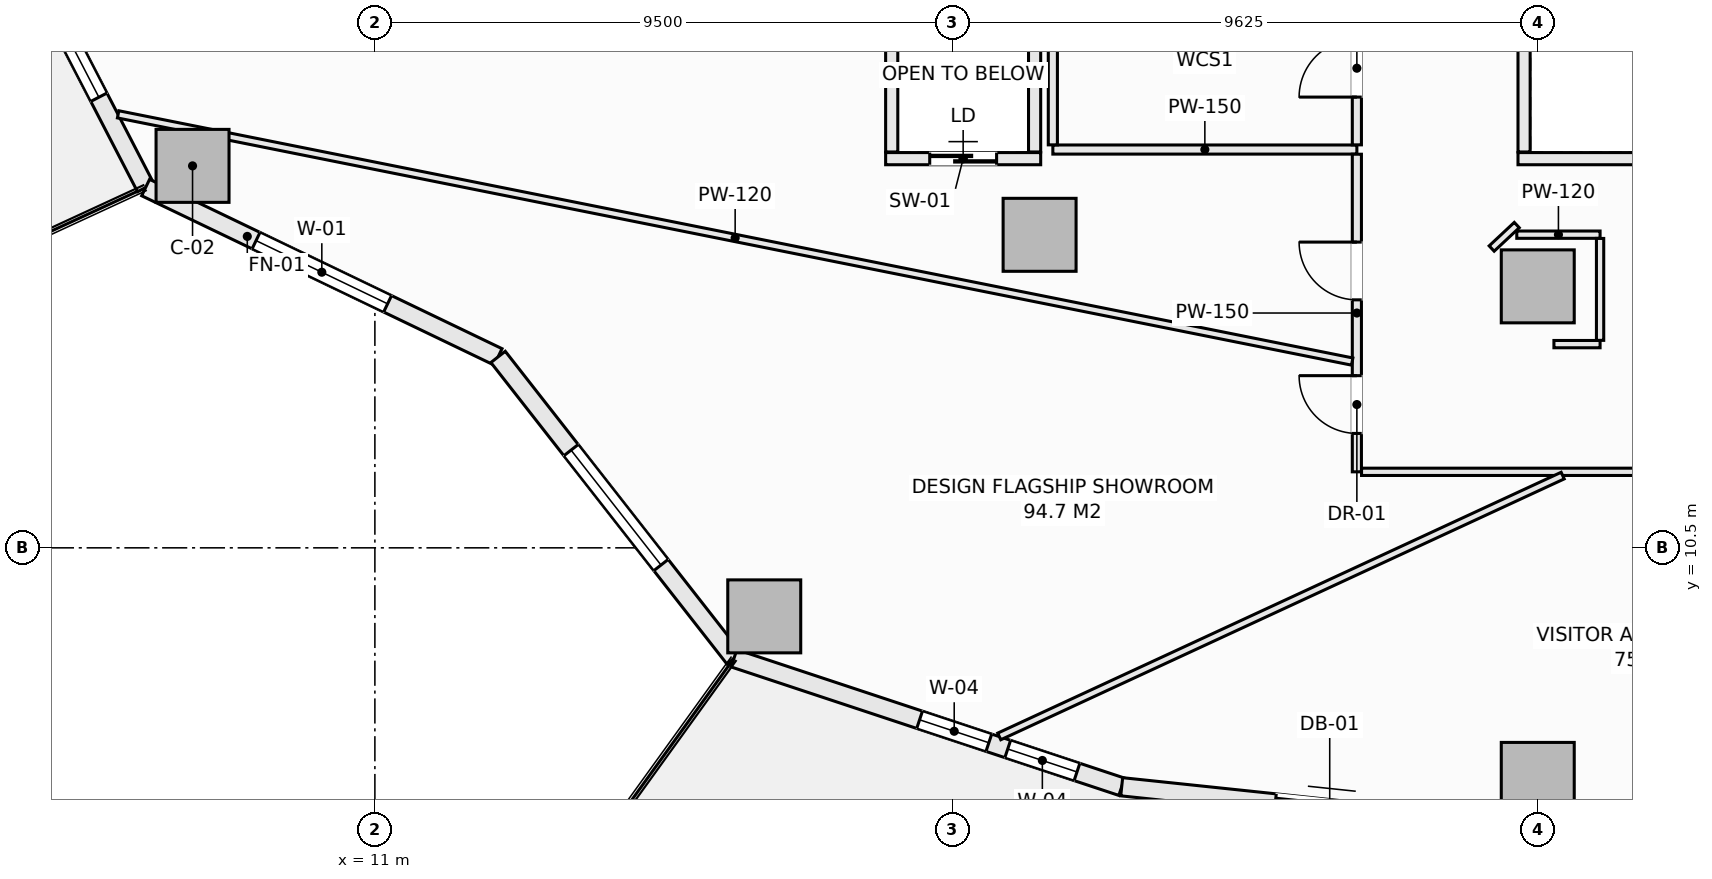
"""IFC4 building model, lengths in metres.
Left out: names, types, materials, properties, quantities, classifications, styles, units other than length and angle.
Written with IfcOpenShell. Run it as: python <this file> out.ifc"""

import sys

from ifc_helpers import new_model, si_unit, direction, frame, frame_2d, origin, origin_2d, place, context, subcontext, project, spatial, rectangle, extrude, element, fill, save


model = new_model("IFC4")
c1 = context("Model", 3, precision=1e-05, world=origin(), true_north=direction((0.0, 1.0)))
c2 = subcontext(c1, "Body", "Model", "MODEL_VIEW")
j1 = project(units=[si_unit("LENGTHUNIT", "METRE"), si_unit("PLANEANGLEUNIT", "RADIAN")], contexts=[c1])
p1 = place(None, origin())
s1 = spatial("IfcSite", under=j1, at=p1, CompositionType="ELEMENT")
p2 = place(p1, origin())
s2 = spatial("IfcBuilding", under=s1, at=p2, CompositionType="ELEMENT")
p3 = place(p2, frame((0.0, 0.0, 57.3)))
s3 = spatial("IfcBuildingStorey", under=s2, at=p3, CompositionType="ELEMENT", Elevation=57.3)
for number, where, z_axis, x_axis in (
    (1, (8.001, 16.781, -0.28), (0.0, 0.0, 1.0), (1.0, 0.0, 0.0)),
    (2, (17.404, 9.373, -0.28), (0.0, 0.0, 1.0), (1.0, 0.0, 0.0)),
    (3, (30.125, 6.7, -0.28), (0.0, 0.0, 1.0), (1.0, 0.0, 0.0)),
    (4, (21.932, 15.648, -0.28), (0.0, 0.0, 1.0), (1.0, 0.0, 0.0)),
    (5, (30.125, 14.8, -0.28), (0.0, 0.0, 1.0), (1.0, 0.0, 0.0)),
):
    element("IfcColumn", number, at=place(p3, frame(where, z_axis=z_axis, x_axis=x_axis)), inside=s3, PredefinedType="COLUMN", context=c2, shape_type="SweptSolid", body=[
        extrude(rectangle(XDim=1.2, YDim=1.2, at=origin_2d()), origin(), (0.0, 0.0, 1.0), 3.85),
    ])
p4 = place(p3, frame((4.588, 21.526, 0.0), z_axis=(0.0, 0.0, 1.0), x_axis=(0.459800981414, -0.888021991558, 0.0)))
e6 = element("IfcWall", 6, at=p4, inside=s3, PredefinedType="SOLIDWALL", context=c2, shape_type="SweptSolid", body=[
    extrude(rectangle(XDim=5.744, YDim=0.3, at=frame_2d((2.872, 0.0))), origin(), (0.0, 0.0, 1.0), 3.093),
])
p5 = place(p4, frame((1.672, 0.0, 0.85)))
e7 = element("IfcOpeningElement", 7, at=p5, cuts=e6, PredefinedType="OPENING", context=c2, shape_type="SweptSolid", body=[
    extrude(rectangle(XDim=2.4, YDim=1.9, at=frame_2d((1.2, 0.95))), frame((0.0, 0.16, 0.0), z_axis=(0.0, -1.0, 0.0), x_axis=(1.0, 0.0, 0.0)), (0.0, 0.0, 1.0), 0.32),
])
p6 = place(p3, frame((7.229, 16.425, 0.0), z_axis=(0.0, 0.0, 1.0), x_axis=(0.901354747727, -0.433081538224, 0.0)))
e8 = element("IfcWall", 8, at=p6, inside=s3, PredefinedType="SOLIDWALL", context=c2, shape_type="SweptSolid", body=[
    extrude(rectangle(XDim=6.431, YDim=0.3, at=frame_2d((3.215, 0.0))), origin(), (0.0, 0.0, 1.0), 3.093),
])
p7 = place(p6, frame((2.015, 0.0, 0.85)))
e9 = element("IfcOpeningElement", 9, at=p7, cuts=e8, PredefinedType="OPENING", context=c2, shape_type="SweptSolid", body=[
    extrude(rectangle(XDim=2.4, YDim=1.9, at=frame_2d((1.2, 0.95))), frame((0.0, 0.16, 0.0), z_axis=(0.0, -1.0, 0.0), x_axis=(1.0, 0.0, 0.0)), (0.0, 0.0, 1.0), 0.32),
])
p8 = place(p3, frame((13.026, 13.64, 0.0), z_axis=(0.0, 0.0, 1.0), x_axis=(0.616434798832, -0.78740595552, 0.0)))
e10 = element("IfcWall", 10, at=p8, inside=s3, PredefinedType="SOLIDWALL", context=c2, shape_type="SweptSolid", body=[
    extrude(rectangle(XDim=6.294, YDim=0.3, at=frame_2d((3.147, 0.0))), origin(), (0.0, 0.0, 1.0), 3.093),
])
p9 = place(p8, frame((1.947, 0.0, 0.85)))
e11 = element("IfcOpeningElement", 11, at=p9, cuts=e10, PredefinedType="OPENING", context=c2, shape_type="SweptSolid", body=[
    extrude(rectangle(XDim=2.4, YDim=1.9, at=frame_2d((1.2, 0.95))), frame((0.0, 0.16, 0.0), z_axis=(0.0, -1.0, 0.0), x_axis=(1.0, 0.0, 0.0)), (0.0, 0.0, 1.0), 0.32),
])
p10 = place(p3, frame((16.906, 8.684, 0.0), z_axis=(0.0, 0.0, 1.0), x_axis=(0.949245153629, -0.314537181127, 0.0)))
e12 = element("IfcWall", 12, at=p10, inside=s3, PredefinedType="SOLIDWALL", context=c2, shape_type="SweptSolid", body=[
    extrude(rectangle(XDim=6.717, YDim=0.3, at=frame_2d((3.358, 0.0))), origin(), (0.0, 0.0, 1.0), 3.093),
])
p11 = place(p10, frame((3.215, 0.0, 0.85)))
e13 = element("IfcOpeningElement", 13, at=p11, cuts=e12, PredefinedType="OPENING", context=c2, shape_type="SweptSolid", body=[
    extrude(rectangle(XDim=1.2, YDim=1.9, at=frame_2d((0.6, 0.95))), frame((0.0, 0.16, 0.0), z_axis=(0.0, -1.0, 0.0), x_axis=(1.0, 0.0, 0.0)), (0.0, 0.0, 1.0), 0.32),
])
p12 = place(p10, frame((4.742, 0.0, 0.85)))
e14 = element("IfcOpeningElement", 14, at=p12, cuts=e12, PredefinedType="OPENING", context=c2, shape_type="SweptSolid", body=[
    extrude(rectangle(XDim=1.2, YDim=1.9, at=frame_2d((0.6, 0.95))), frame((0.0, 0.16, 0.0), z_axis=(0.0, -1.0, 0.0), x_axis=(1.0, 0.0, 0.0)), (0.0, 0.0, 1.0), 0.32),
])
p13 = place(p3, frame((23.282, 6.571, 0.0), z_axis=(0.0, 0.0, 1.0), x_axis=(0.994498840295, -0.104747585419, 0.0)))
e15 = element("IfcWall", 15, at=p13, inside=s3, PredefinedType="SOLIDWALL", context=c2, shape_type="SweptSolid", body=[
    extrude(rectangle(XDim=6.88, YDim=0.3, at=frame_2d((3.44, 0.0))), origin(), (0.0, 0.0, 1.0), 3.093),
])
p14 = place(p13, frame((2.54, 0.0, 0.0)))
e16 = element("IfcOpeningElement", 16, at=p14, cuts=e15, PredefinedType="OPENING", context=c2, shape_type="SweptSolid", body=[
    extrude(rectangle(XDim=1.8, YDim=2.25, at=frame_2d((0.9, 1.125))), frame((0.0, 0.16, 0.0), z_axis=(0.0, -1.0, 0.0), x_axis=(1.0, 0.0, 0.0)), (0.0, 0.0, 1.0), 0.32),
])
p15 = place(p3, frame((30.125, 5.85, 0.0), z_axis=(0.0, 0.0, 1.0), x_axis=(0.994498840295, 0.104747585419, 0.0)))
e17 = element("IfcWall", 17, at=p15, inside=s3, PredefinedType="SOLIDWALL", context=c2, shape_type="SweptSolid", body=[
    extrude(rectangle(XDim=6.88, YDim=0.3, at=frame_2d((3.44, 0.0))), origin(), (0.0, 0.0, 1.0), 3.093),
])
p16 = place(p15, frame((2.24, 0.0, 0.85)))
e18 = element("IfcOpeningElement", 18, at=p16, cuts=e17, PredefinedType="OPENING", context=c2, shape_type="SweptSolid", body=[
    extrude(rectangle(XDim=2.4, YDim=1.9, at=frame_2d((1.2, 0.95))), frame((0.0, 0.16, 0.0), z_axis=(0.0, -1.0, 0.0), x_axis=(1.0, 0.0, 0.0)), (0.0, 0.0, 1.0), 0.32),
])
p17 = place(p3, frame((19.4, 16.9, 0.0), z_axis=(0.0, 0.0, 1.0), x_axis=(1.0, 0.0, 0.0)))
e19 = element("IfcWall", 19, at=p17, inside=s3, PredefinedType="SOLIDWALL", context=c2, shape_type="SweptSolid", body=[
    extrude(rectangle(XDim=2.55, YDim=0.2, at=frame_2d((1.275, 0.0))), origin(), (0.0, 0.0, 1.0), 3.57),
])
p18 = place(p17, frame((0.725, 0.0, 0.0)))
e20 = element("IfcOpeningElement", 20, at=p18, cuts=e19, PredefinedType="OPENING", context=c2, shape_type="SweptSolid", body=[
    extrude(rectangle(XDim=1.1, YDim=2.2, at=frame_2d((0.55, 1.1))), frame((0.0, 0.11, 0.0), z_axis=(0.0, -1.0, 0.0), x_axis=(1.0, 0.0, 0.0)), (0.0, 0.0, 1.0), 0.22),
])
for number, where, z_axis, x_axis in (
    (21, (19.5, 17.01, 0.0), (0.0, 0.0, 1.0), (0.0, 1.0, 0.0)),
    (22, (21.85, 17.01, 0.0), (0.0, 0.0, 1.0), (0.0, 1.0, 0.0)),
):
    element("IfcWall", number, at=place(p3, frame(where, z_axis=z_axis, x_axis=x_axis)), inside=s3, PredefinedType="SOLIDWALL", context=c2, shape_type="SweptSolid", body=[
        extrude(rectangle(XDim=2.53, YDim=0.2, at=frame_2d((1.265, 0.0))), origin(), (0.0, 0.0, 1.0), 3.57),
    ])
p19 = place(p3, frame((29.8, 16.9, 0.0), z_axis=(0.0, 0.0, 1.0), x_axis=(1.0, 0.0, 0.0)))
e23 = element("IfcWall", 23, at=p19, inside=s3, PredefinedType="SOLIDWALL", context=c2, shape_type="SweptSolid", body=[
    extrude(rectangle(XDim=2.45, YDim=0.2, at=frame_2d((1.225, 0.0))), origin(), (0.0, 0.0, 1.0), 3.57),
])
p20 = place(p3, frame((29.9, 17.01, 0.0), z_axis=(0.0, 0.0, 1.0), x_axis=(0.0, 1.0, 0.0)))
e24 = element("IfcWall", 24, at=p20, inside=s3, PredefinedType="SOLIDWALL", context=c2, shape_type="SweptSolid", body=[
    extrude(rectangle(XDim=2.43, YDim=0.2, at=frame_2d((1.215, 0.0))), origin(), (0.0, 0.0, 1.0), 3.57),
])
p21 = place(p3, frame((22.15, 17.05, 0.0), z_axis=(0.0, 0.0, 1.0), x_axis=(1.0, 0.0, 0.0)))
e25 = element("IfcWall", 25, at=p21, inside=s3, PredefinedType="PARTITIONING", context=c2, shape_type="SweptSolid", body=[
    extrude(rectangle(XDim=5.0, YDim=0.15, at=frame_2d((2.5, 0.0))), origin(), (0.0, 0.0, 1.0), 3.57),
])
p22 = place(p3, frame((22.15, 17.127, 0.0), z_axis=(0.0, 0.0, 1.0), x_axis=(0.0, 1.0, 0.0)))
e26 = element("IfcWall", 26, at=p22, inside=s3, PredefinedType="PARTITIONING", context=c2, shape_type="SweptSolid", body=[
    extrude(rectangle(XDim=2.521, YDim=0.15, at=frame_2d((1.26, 0.0))), origin(), (0.0, 0.0, 1.0), 3.57),
])
p23 = place(p3, frame((27.15, 11.75, 0.0), z_axis=(0.0, 0.0, 1.0), x_axis=(0.0, 1.0, 0.0)))
e27 = element("IfcWall", 27, at=p23, inside=s3, PredefinedType="PARTITIONING", context=c2, shape_type="SweptSolid", body=[
    extrude(rectangle(XDim=5.223, YDim=0.15, at=frame_2d((2.611, 0.0))), origin(), (0.0, 0.0, 1.0), 3.57),
])
p24 = place(p23, frame((0.631, 0.0, 0.0)))
e28 = element("IfcOpeningElement", 28, at=p24, cuts=e27, PredefinedType="OPENING", context=c2, shape_type="SweptSolid", body=[
    extrude(rectangle(XDim=0.95, YDim=2.1, at=frame_2d((0.475, 1.05))), frame((0.0, 0.085, 0.0), z_axis=(0.0, -1.0, 0.0), x_axis=(1.0, 0.0, 0.0)), (0.0, 0.0, 1.0), 0.17),
])
p25 = place(p23, frame((2.828, 0.0, 0.0)))
e29 = element("IfcOpeningElement", 29, at=p25, cuts=e27, PredefinedType="OPENING", context=c2, shape_type="SweptSolid", body=[
    extrude(rectangle(XDim=0.95, YDim=2.1, at=frame_2d((0.475, 1.05))), frame((0.0, 0.085, 0.0), z_axis=(0.0, -1.0, 0.0), x_axis=(1.0, 0.0, 0.0)), (0.0, 0.0, 1.0), 0.17),
])
p26 = place(p3, frame((27.15, 17.127, 0.0), z_axis=(0.0, 0.0, 1.0), x_axis=(0.0, 1.0, 0.0)))
e30 = element("IfcWall", 30, at=p26, inside=s3, PredefinedType="PARTITIONING", context=c2, shape_type="SweptSolid", body=[
    extrude(rectangle(XDim=2.521, YDim=0.15, at=frame_2d((1.26, 0.0))), origin(), (0.0, 0.0, 1.0), 3.57),
])
p27 = place(p26, frame((0.785, 0.0, 0.0)))
e31 = element("IfcOpeningElement", 31, at=p27, cuts=e30, PredefinedType="OPENING", context=c2, shape_type="SweptSolid", body=[
    extrude(rectangle(XDim=0.95, YDim=2.1, at=frame_2d((0.475, 1.05))), frame((0.0, 0.085, 0.0), z_axis=(0.0, -1.0, 0.0), x_axis=(1.0, 0.0, 0.0)), (0.0, 0.0, 1.0), 0.17),
])
p28 = place(p3, frame((29.78, 15.65, 0.0), z_axis=(0.0, 0.0, 1.0), x_axis=(1.0, 0.0, 0.0)))
e32 = element("IfcWall", 32, at=p28, inside=s3, PredefinedType="PARTITIONING", context=c2, shape_type="SweptSolid", body=[
    extrude(rectangle(XDim=1.37, YDim=0.12, at=frame_2d((0.685, 0.0))), origin(), (0.0, 0.0, 1.0), 3.57),
])
p29 = place(p3, frame((27.227, 11.75, 0.0), z_axis=(0.0, 0.0, 1.0), x_axis=(1.0, 0.0, 0.0)))
e33 = element("IfcWall", 33, at=p29, inside=s3, PredefinedType="PARTITIONING", context=c2, shape_type="SweptSolid", body=[
    extrude(rectangle(XDim=8.661, YDim=0.12, at=frame_2d((4.331, 0.0))), origin(), (0.0, 0.0, 1.0), 3.57),
])
p30 = place(p29, frame((5.206, 0.0, 0.0)))
e34 = element("IfcOpeningElement", 34, at=p30, cuts=e33, PredefinedType="OPENING", context=c2, shape_type="SweptSolid", body=[
    extrude(rectangle(XDim=0.95, YDim=2.1, at=frame_2d((0.475, 1.05))), frame((0.0, 0.07, 0.0), z_axis=(0.0, -1.0, 0.0), x_axis=(1.0, 0.0, 0.0)), (0.0, 0.0, 1.0), 0.14),
])
p31 = place(p3, frame((29.367, 15.422, 0.0), z_axis=(0.0, 0.0, 1.0), x_axis=(0.730667420492, 0.682733564893, 0.0)))
e35 = element("IfcWall", 35, at=p31, inside=s3, PredefinedType="PARTITIONING", context=c2, shape_type="SweptSolid", body=[
    extrude(rectangle(XDim=0.565, YDim=0.12, at=frame_2d((0.283, 0.0))), origin(), (0.0, 0.0, 1.0), 3.57),
])
p32 = place(p3, frame((30.391, 13.85, 0.0), z_axis=(0.0, 0.0, 1.0), x_axis=(1.0, 0.0, 0.0)))
e36 = element("IfcWall", 36, at=p32, inside=s3, PredefinedType="PARTITIONING", context=c2, shape_type="SweptSolid", body=[
    extrude(rectangle(XDim=0.759, YDim=0.12, at=frame_2d((0.379, 0.0))), origin(), (0.0, 0.0, 1.0), 3.57),
])
p33 = place(p3, frame((31.15, 13.912, 0.0), z_axis=(0.0, 0.0, 1.0), x_axis=(0.0, 1.0, 0.0)))
e37 = element("IfcWall", 37, at=p33, inside=s3, PredefinedType="PARTITIONING", context=c2, shape_type="SweptSolid", body=[
    extrude(rectangle(XDim=1.676, YDim=0.12, at=frame_2d((0.838, 0.0))), origin(), (0.0, 0.0, 1.0), 3.57),
])
p34 = place(p3, frame((6.777, 17.629, 0.0), z_axis=(0.0, 0.0, 1.0), x_axis=(0.980522111168, -0.19640873074, 0.0)))
e38 = element("IfcWall", 38, at=p34, inside=s3, PredefinedType="PARTITIONING", context=c2, shape_type="SweptSolid", body=[
    extrude(rectangle(XDim=20.699, YDim=0.12, at=frame_2d((10.349, 0.0))), origin(), (0.0, 0.0, 1.0), 3.205),
])
p35 = place(p3, frame((21.269, 7.398, 0.0), z_axis=(0.0, 0.0, 1.0), x_axis=(0.907478047532, 0.420099503983, 0.0)))
e39 = element("IfcWall", 39, at=p35, inside=s3, PredefinedType="PARTITIONING", context=c2, shape_type="SweptSolid", body=[
    extrude(rectangle(XDim=10.211, YDim=0.12, at=frame_2d((5.106, 0.0))), origin(), (0.0, 0.0, 1.0), 3.093),
])
p36 = place(p5, origin())
e40 = element("IfcWindow", 40, at=p36, inside=s3, PartitioningType="SINGLE_PANEL", PredefinedType="WINDOW", context=c2, shape_type="SweptSolid", body=[
    extrude(rectangle(XDim=2.4, YDim=1.9, at=frame_2d((1.2, 0.95))), frame((0.0, 0.03, 0.0), z_axis=(0.0, -1.0, 0.0), x_axis=(1.0, 0.0, 0.0)), (0.0, 0.0, 1.0), 0.06),
])
fill(e7, e40)
p37 = place(p7, origin())
e41 = element("IfcWindow", 41, at=p37, inside=s3, PartitioningType="SINGLE_PANEL", PredefinedType="WINDOW", context=c2, shape_type="SweptSolid", body=[
    extrude(rectangle(XDim=2.4, YDim=1.9, at=frame_2d((1.2, 0.95))), frame((0.0, 0.03, 0.0), z_axis=(0.0, -1.0, 0.0), x_axis=(1.0, 0.0, 0.0)), (0.0, 0.0, 1.0), 0.06),
])
fill(e9, e41)
p38 = place(p9, origin())
e42 = element("IfcWindow", 42, at=p38, inside=s3, PartitioningType="SINGLE_PANEL", PredefinedType="WINDOW", context=c2, shape_type="SweptSolid", body=[
    extrude(rectangle(XDim=2.4, YDim=1.9, at=frame_2d((1.2, 0.95))), frame((0.0, 0.03, 0.0), z_axis=(0.0, -1.0, 0.0), x_axis=(1.0, 0.0, 0.0)), (0.0, 0.0, 1.0), 0.06),
])
fill(e11, e42)
p39 = place(p11, origin())
e43 = element("IfcWindow", 43, at=p39, inside=s3, PartitioningType="SINGLE_PANEL", PredefinedType="WINDOW", context=c2, shape_type="SweptSolid", body=[
    extrude(rectangle(XDim=1.2, YDim=1.9, at=frame_2d((0.6, 0.95))), frame((0.0, 0.03, 0.0), z_axis=(0.0, -1.0, 0.0), x_axis=(1.0, 0.0, 0.0)), (0.0, 0.0, 1.0), 0.06),
])
fill(e13, e43)
p40 = place(p18, origin())
e44 = element("IfcDoor", 44, at=p40, inside=s3, OperationType="SLIDING_TO_LEFT", PredefinedType="DOOR", context=c2, shape_type="SweptSolid", body=[
    extrude(rectangle(XDim=1.1, YDim=2.2, at=frame_2d((0.55, 1.1))), frame((0.0, 0.025, 0.0), z_axis=(0.0, -1.0, 0.0), x_axis=(1.0, 0.0, 0.0)), (0.0, 0.0, 1.0), 0.05),
])
fill(e20, e44)
p41 = place(p27, origin())
e45 = element("IfcDoor", 45, at=p41, inside=s3, OperationType="SINGLE_SWING_LEFT", PredefinedType="DOOR", context=c2, shape_type="SweptSolid", body=[
    extrude(rectangle(XDim=0.95, YDim=2.1, at=frame_2d((0.475, 1.05))), frame((0.0, 0.025, 0.0), z_axis=(0.0, -1.0, 0.0), x_axis=(1.0, 0.0, 0.0)), (0.0, 0.0, 1.0), 0.05),
])
fill(e31, e45)
p42 = place(p24, origin())
e46 = element("IfcDoor", 46, at=p42, inside=s3, OperationType="SINGLE_SWING_RIGHT", PredefinedType="DOOR", context=c2, shape_type="SweptSolid", body=[
    extrude(rectangle(XDim=0.95, YDim=2.1, at=frame_2d((0.475, 1.05))), frame((0.0, 0.025, 0.0), z_axis=(0.0, -1.0, 0.0), x_axis=(1.0, 0.0, 0.0)), (0.0, 0.0, 1.0), 0.05),
])
fill(e28, e46)
p43 = place(p25, origin())
e47 = element("IfcDoor", 47, at=p43, inside=s3, OperationType="SINGLE_SWING_RIGHT", PredefinedType="DOOR", context=c2, shape_type="SweptSolid", body=[
    extrude(rectangle(XDim=0.95, YDim=2.1, at=frame_2d((0.475, 1.05))), frame((0.0, 0.025, 0.0), z_axis=(0.0, -1.0, 0.0), x_axis=(1.0, 0.0, 0.0)), (0.0, 0.0, 1.0), 0.05),
])
fill(e29, e47)
p44 = place(p12, origin())
e48 = element("IfcWindow", 48, at=p44, inside=s3, PartitioningType="SINGLE_PANEL", PredefinedType="WINDOW", context=c2, shape_type="SweptSolid", body=[
    extrude(rectangle(XDim=1.2, YDim=1.9, at=frame_2d((0.6, 0.95))), frame((0.0, 0.03, 0.0), z_axis=(0.0, -1.0, 0.0), x_axis=(1.0, 0.0, 0.0)), (0.0, 0.0, 1.0), 0.06),
])
fill(e14, e48)
save(model, sys.argv[1])
